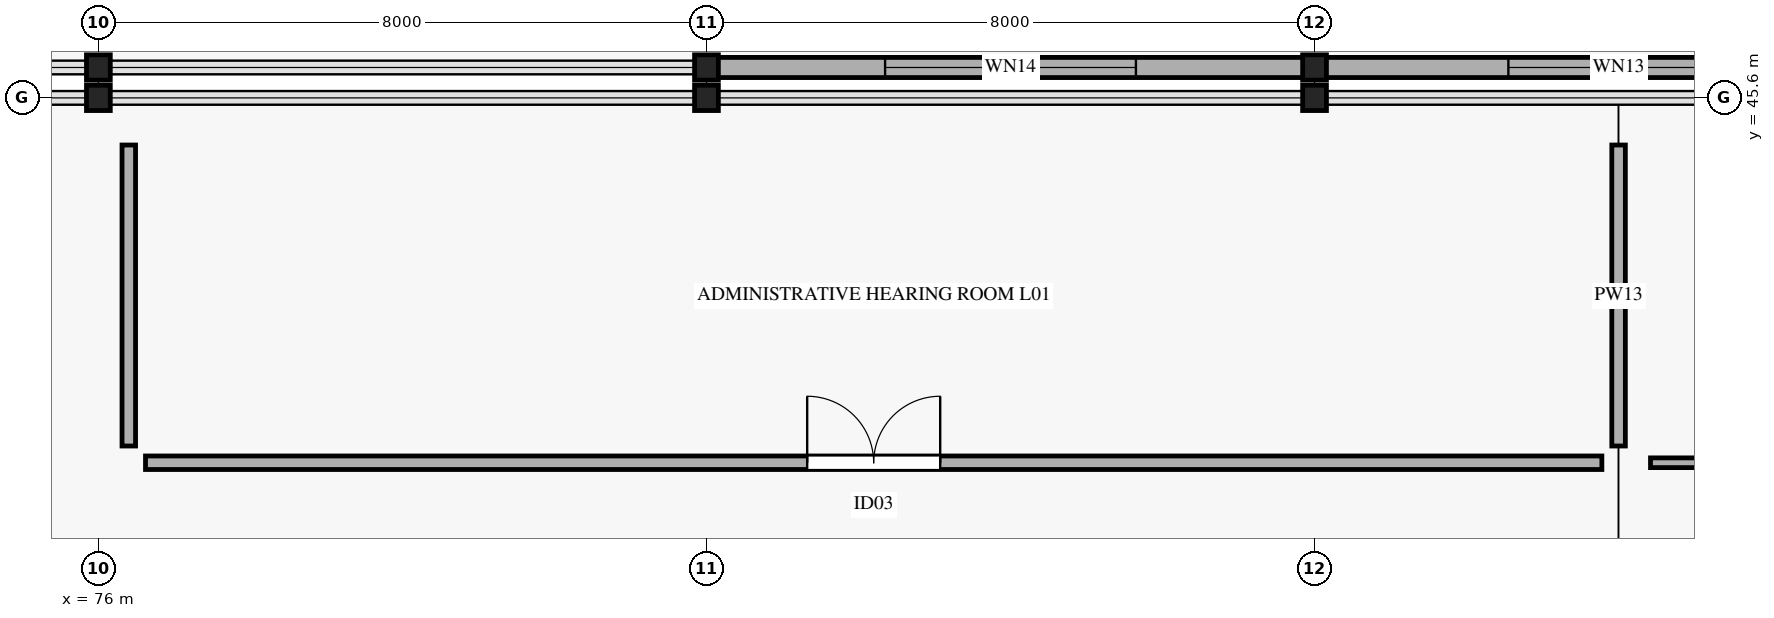
"""IFC4 building model, lengths in metres.
Left out: names, types, materials, properties, quantities, classifications, styles, units other than length and angle.
Written with IfcOpenShell. Run it as: python <this file> out.ifc"""

import sys

from ifc_helpers import new_model, si_unit, direction, frame, frame_2d, origin, origin_2d, place, context, subcontext, project, spatial, rectangle, i_section, extrude, element, fill, save


model = new_model("IFC4")
c1 = context("Model", 3, precision=1e-05, world=origin(), true_north=direction((0.0, 1.0)))
c2 = subcontext(c1, "Body", "Model", "MODEL_VIEW")
j1 = project(units=[si_unit("LENGTHUNIT", "METRE"), si_unit("PLANEANGLEUNIT", "RADIAN")], contexts=[c1])
p1 = place(None, origin())
s1 = spatial("IfcSite", under=j1, at=p1, CompositionType="ELEMENT")
p2 = place(p1, origin())
s2 = spatial("IfcBuilding", under=s1, at=p2, CompositionType="ELEMENT")
p3 = place(p2, frame((0.0, 0.0, 5.4)))
s3 = spatial("IfcBuildingStorey", under=s2, at=p3, CompositionType="ELEMENT", Elevation=5.4)
for number, where, z_axis, x_axis in (
    (1, (76.0, 45.6, 0.0), (0.0, 0.0, 1.0), (1.0, 0.0, 0.0)),
    (2, (84.0, 45.6, 0.0), (0.0, 0.0, 1.0), (1.0, 0.0, 0.0)),
    (3, (92.0, 45.6, 0.0), (0.0, 0.0, 1.0), (1.0, 0.0, 0.0)),
    (4, (76.0, 46.0, 0.0), (0.0, 0.0, 1.0), (1.0, 0.0, 0.0)),
    (5, (84.0, 46.0, 0.0), (0.0, 0.0, 1.0), (1.0, 0.0, 0.0)),
    (6, (92.0, 46.0, 0.0), (0.0, 0.0, 1.0), (1.0, 0.0, 0.0)),
):
    element("IfcColumn", number, at=place(p3, frame(where, z_axis=z_axis, x_axis=x_axis)), inside=s3, PredefinedType="COLUMN", context=c2, shape_type="SweptSolid", body=[
        extrude(i_section(OverallWidth=0.313, OverallDepth=0.333, WebThickness=0.018, FlangeThickness=0.028, FilletRadius=0.015, at=origin_2d()), origin(), (0.0, 0.0, 1.0), 5.185),
    ])
p4 = place(p3, frame((100.02, 46.0, 0.0), z_axis=(0.0, 0.0, 1.0), x_axis=(-1.0, 0.0, 0.0)))
e7 = element("IfcWall", 7, at=p4, inside=s3, PredefinedType="STANDARD", context=c2, shape_type="SweptSolid", body=[
    extrude(rectangle(XDim=8.04, YDim=0.265, at=frame_2d((4.02, 0.0))), origin(), (0.0, 0.0, 1.0), 4.25),
])
p5 = place(p4, frame((2.57, 0.0, 0.75)))
e8 = element("IfcOpeningElement", 8, at=p5, cuts=e7, PredefinedType="OPENING", context=c2, shape_type="SweptSolid", body=[
    extrude(rectangle(XDim=2.9, YDim=2.15, at=frame_2d((1.45, 1.075))), frame((0.0, 0.142, 0.0), z_axis=(0.0, -1.0, 0.0), x_axis=(1.0, 0.0, 0.0)), (0.0, 0.0, 1.0), 0.285),
])
p6 = place(p3, frame((92.02, 46.0, 0.0), z_axis=(0.0, 0.0, 1.0), x_axis=(-1.0, 0.0, 0.0)))
e9 = element("IfcWall", 9, at=p6, inside=s3, PredefinedType="STANDARD", context=c2, shape_type="SweptSolid", body=[
    extrude(rectangle(XDim=8.04, YDim=0.265, at=frame_2d((4.02, 0.0))), origin(), (0.0, 0.0, 1.0), 4.25),
])
p7 = place(p6, frame((2.37, 0.0, 0.75)))
e10 = element("IfcOpeningElement", 10, at=p7, cuts=e9, PredefinedType="OPENING", context=c2, shape_type="SweptSolid", body=[
    extrude(rectangle(XDim=3.3, YDim=2.15, at=frame_2d((1.65, 1.075))), frame((0.0, 0.142, 0.0), z_axis=(0.0, -1.0, 0.0), x_axis=(1.0, 0.0, 0.0)), (0.0, 0.0, 1.0), 0.285),
])
p8 = place(p3, frame((76.62, 40.8, 0.0), z_axis=(0.0, 0.0, 1.0), x_axis=(1.0, 0.0, 0.0)))
e11 = element("IfcWall", 11, at=p8, inside=s3, PredefinedType="PARTITIONING", context=c2, shape_type="SweptSolid", body=[
    extrude(rectangle(XDim=19.16, YDim=0.178, at=frame_2d((9.58, 0.0))), origin(), (0.0, 0.0, 1.0), 4.05),
])
p9 = place(p8, frame((8.705, 0.0, 0.0)))
e12 = element("IfcOpeningElement", 12, at=p9, cuts=e11, PredefinedType="OPENING", context=c2, shape_type="SweptSolid", body=[
    extrude(rectangle(XDim=1.75, YDim=2.35, at=frame_2d((0.875, 1.175))), frame((0.0, 0.099, 0.0), z_axis=(0.0, -1.0, 0.0), x_axis=(1.0, 0.0, 0.0)), (0.0, 0.0, 1.0), 0.198),
])
for number, where, z_axis, x_axis in (
    (13, (96.0, 41.02, 0.0), (0.0, 0.0, 1.0), (0.0, 1.0, 0.0)),
    (14, (76.4, 41.02, 0.0), (0.0, 0.0, 1.0), (0.0, 1.0, 0.0)),
):
    element("IfcWall", number, at=place(p3, frame(where, z_axis=z_axis, x_axis=x_axis)), inside=s3, PredefinedType="PARTITIONING", context=c2, shape_type="SweptSolid", body=[
        extrude(rectangle(XDim=3.96, YDim=0.178, at=frame_2d((1.98, 0.0))), origin(), (0.0, 0.0, 1.0), 4.05),
    ])
p10 = place(p3, frame((96.42, 40.8, 0.0), z_axis=(0.0, 0.0, 1.0), x_axis=(1.0, 0.0, 0.0)))
e15 = element("IfcWall", 15, at=p10, inside=s3, PredefinedType="PARTITIONING", context=c2, shape_type="SweptSolid", body=[
    extrude(rectangle(XDim=18.96, YDim=0.128, at=frame_2d((9.48, 0.0))), origin(), (0.0, 0.0, 1.0), 4.05),
])
p11 = place(p10, frame((8.68, 0.0, 0.0)))
e16 = element("IfcOpeningElement", 16, at=p11, cuts=e15, PredefinedType="OPENING", context=c2, shape_type="SweptSolid", body=[
    extrude(rectangle(XDim=1.6, YDim=2.35, at=frame_2d((0.8, 1.175))), frame((0.0, 0.074, 0.0), z_axis=(0.0, -1.0, 0.0), x_axis=(1.0, 0.0, 0.0)), (0.0, 0.0, 1.0), 0.148),
])
p12 = place(p5, origin())
e17 = element("IfcWindow", 17, at=p12, inside=s3, PartitioningType="SINGLE_PANEL", PredefinedType="WINDOW", context=c2, shape_type="SweptSolid", body=[
    extrude(rectangle(XDim=2.9, YDim=2.15, at=frame_2d((1.45, 1.075))), frame((0.0, 0.03, 0.0), z_axis=(0.0, -1.0, 0.0), x_axis=(1.0, 0.0, 0.0)), (0.0, 0.0, 1.0), 0.06),
])
fill(e8, e17)
p13 = place(p7, origin())
e18 = element("IfcWindow", 18, at=p13, inside=s3, PartitioningType="SINGLE_PANEL", PredefinedType="WINDOW", context=c2, shape_type="SweptSolid", body=[
    extrude(rectangle(XDim=3.3, YDim=2.15, at=frame_2d((1.65, 1.075))), frame((0.0, 0.03, 0.0), z_axis=(0.0, -1.0, 0.0), x_axis=(1.0, 0.0, 0.0)), (0.0, 0.0, 1.0), 0.06),
])
fill(e10, e18)
p14 = place(p9, origin())
e19 = element("IfcDoor", 19, at=p14, inside=s3, OperationType="DOUBLE_DOOR_SINGLE_SWING", PredefinedType="DOOR", context=c2, shape_type="SweptSolid", body=[
    extrude(rectangle(XDim=1.75, YDim=2.35, at=frame_2d((0.875, 1.175))), frame((0.0, 0.025, 0.0), z_axis=(0.0, -1.0, 0.0), x_axis=(1.0, 0.0, 0.0)), (0.0, 0.0, 1.0), 0.05),
])
fill(e12, e19)
save(model, sys.argv[1])
